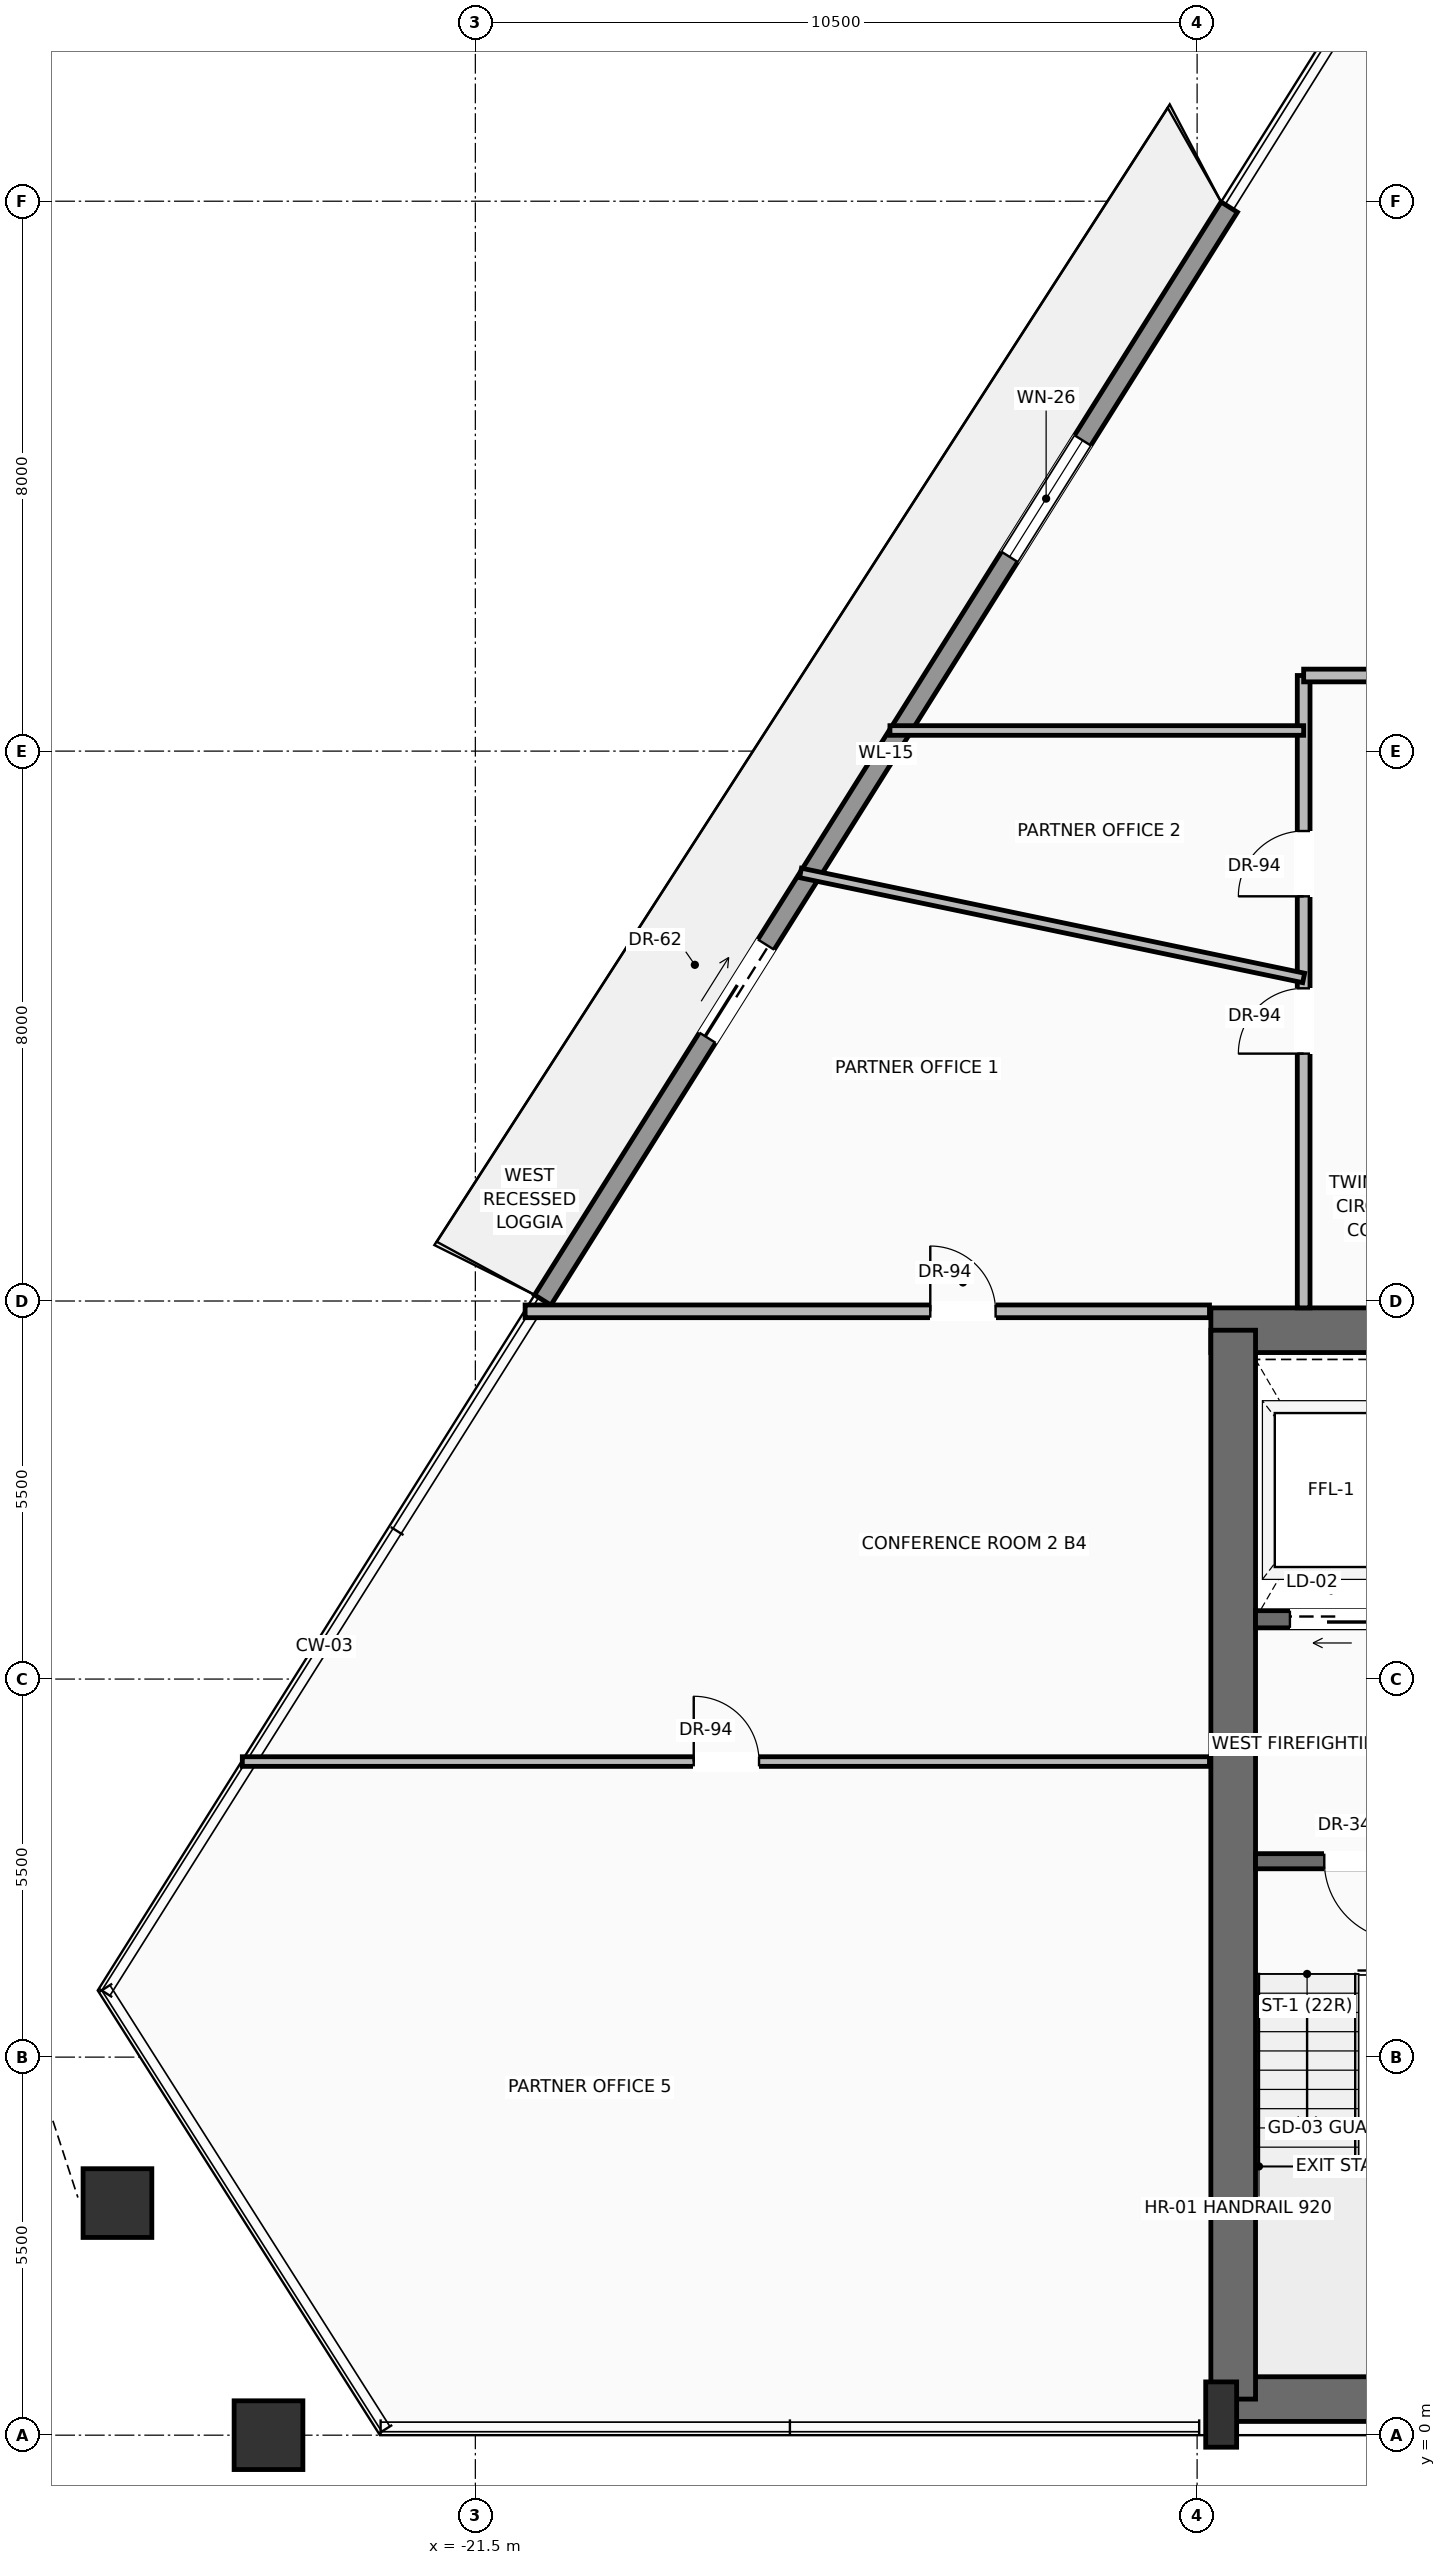
"""IFC4 building model, lengths in metres.
Left out: names, types, materials, properties, quantities, classifications, styles, units other than length and angle.
Written with IfcOpenShell. Run it as: python <this file> out.ifc"""

import sys

from ifc_helpers import new_model, si_unit, direction, frame, frame_2d, origin, origin_2d, place, context, subcontext, project, spatial, rectangle, hollow_rectangle, extrude, source, transform, mapped, element, fill, save


model = new_model("IFC4")
c1 = context("Model", 3, precision=1e-05, world=origin(), true_north=direction((0.0, 1.0)))
c2 = subcontext(c1, "Body", "Model", "MODEL_VIEW")
j1 = project(units=[si_unit("LENGTHUNIT", "METRE"), si_unit("PLANEANGLEUNIT", "RADIAN")], contexts=[c1])
p1 = place(None, origin())
s1 = spatial("IfcSite", under=j1, at=p1, CompositionType="ELEMENT")
p2 = place(p1, origin())
s2 = spatial("IfcBuilding", under=s1, at=p2, CompositionType="ELEMENT")
p3 = place(p2, frame((0.0, 0.0, 174.7)))
s3 = spatial("IfcBuildingStorey", under=s2, at=p3, CompositionType="ELEMENT", Elevation=174.7)
p4 = place(p3, frame((-10.65, 0.525, 0.0), z_axis=(0.0, 0.0, 1.0), x_axis=(1.0, 0.0, 0.0)))
e1 = element("IfcWall", 1, at=p4, inside=s3, PredefinedType="SHEAR", context=c2, shape_type="SweptSolid", body=[
    extrude(rectangle(XDim=21.3, YDim=0.65, at=frame_2d((10.65, 0.0))), origin(), (0.0, 0.0, 1.0), 3.47),
])
p5 = place(p3, frame((-10.8, 16.075, 0.0), z_axis=(0.0, 0.0, 1.0), x_axis=(1.0, 0.0, 0.0)))
e2 = element("IfcWall", 2, at=p5, inside=s3, PredefinedType="SHEAR", context=c2, shape_type="SweptSolid", body=[
    extrude(rectangle(XDim=21.6, YDim=0.65, at=frame_2d((10.8, 0.0))), origin(), (0.0, 0.0, 1.0), 3.47),
])
p6 = place(p5, frame((3.37, 0.0, 0.0)))
e3 = element("IfcOpeningElement", 3, at=p6, cuts=e2, PredefinedType="OPENING", context=c2, shape_type="SweptSolid", body=[
    extrude(rectangle(XDim=1.3, YDim=2.3, at=frame_2d((0.65, 1.15))), frame((0.0, 0.335, 0.0), z_axis=(0.0, -1.0, 0.0), x_axis=(1.0, 0.0, 0.0)), (0.0, 0.0, 1.0), 0.67),
])
p7 = place(p5, frame((9.8, 0.0, 0.0)))
e4 = element("IfcOpeningElement", 4, at=p7, cuts=e2, PredefinedType="OPENING", context=c2, shape_type="SweptSolid", body=[
    extrude(rectangle(XDim=2.0, YDim=2.4, at=frame_2d((1.0, 1.2))), frame((0.0, 0.335, 0.0), z_axis=(0.0, -1.0, 0.0), x_axis=(1.0, 0.0, 0.0)), (0.0, 0.0, 1.0), 0.67),
])
p8 = place(p3, frame((-10.475, 0.525, 0.0), z_axis=(0.0, 0.0, 1.0), x_axis=(0.0, 1.0, 0.0)))
e5 = element("IfcWall", 5, at=p8, inside=s3, PredefinedType="SHEAR", context=c2, shape_type="SweptSolid", body=[
    extrude(rectangle(XDim=15.55, YDim=0.65, at=frame_2d((7.775, 0.0))), origin(), (0.0, 0.0, 1.0), 3.47),
])
m1 = source(origin(), c2, "Body", "SweptSolid", [
    extrude(rectangle(XDim=0.45, YDim=0.95, at=origin_2d()), origin(), (0.0, 0.0, 1.0), 3.7),
])
p9 = place(p3, frame((-10.65, 0.3, 0.0), z_axis=(0.0, 0.0, 1.0), x_axis=(1.0, 0.0, 0.0)))
e6 = element("IfcColumn", 6, at=p9, inside=s3, PredefinedType="PILASTER", context=c2, shape_type="MappedRepresentation", body=[
    mapped(m1, transform((0.0, 0.0, 0.0), scale=1.0)),
])
m2 = source(origin(), c2, "Body", "SweptSolid", [
    extrude(hollow_rectangle(XDim=1.0, YDim=1.0, WallThickness=0.05, at=origin_2d()), origin(), (0.0, 0.0, 1.0), 3.691),
])
p10 = place(p3, frame((-24.509, 0.0, 0.004), z_axis=(-0.008135189482, 0.0, 0.999966908799), x_axis=(0.0, -1.0, 0.0)))
e7 = element("IfcColumn", 7, at=p10, inside=s3, PredefinedType="COLUMN", context=c2, shape_type="MappedRepresentation", body=[
    mapped(m2, transform((0.0, 0.0, 0.0), scale=1.0)),
])
m3 = source(origin(), c2, "Body", "SweptSolid", [
    extrude(hollow_rectangle(XDim=1.0, YDim=1.0, WallThickness=0.05, at=origin_2d()), origin(), (0.0, 0.0, 1.0), 3.692),
])
p11 = place(p3, frame((-26.707, 3.376, 0.004), z_axis=(0.002314679744, -0.015607554842, 0.999875515497), x_axis=(0.989180946289, 0.146700564068, 0.0)))
e8 = element("IfcColumn", 8, at=p11, inside=s3, PredefinedType="COLUMN", context=c2, shape_type="MappedRepresentation", body=[
    mapped(m3, transform((0.0, 0.0, 0.0), scale=1.0)),
])
p12 = place(p3, frame((-20.519, 16.514, 0.0), z_axis=(0.0, 0.0, 1.0), x_axis=(0.531871143151, 0.846825299034, 0.0)))
e9 = element("IfcWall", 9, at=p12, inside=s3, PredefinedType="SOLIDWALL", context=c2, shape_type="SweptSolid", body=[
    extrude(rectangle(XDim=18.777, YDim=0.28, at=frame_2d((9.388, 0.0))), origin(), (0.0, 0.0, 1.0), 3.05),
])
p13 = place(p12, frame((4.506, 0.0, 0.0)))
e10 = element("IfcOpeningElement", 10, at=p13, cuts=e9, PredefinedType="OPENING", context=c2, shape_type="SweptSolid", body=[
    extrude(rectangle(XDim=1.6, YDim=2.35, at=frame_2d((0.8, 1.175))), frame((0.0, 0.15, 0.0), z_axis=(0.0, -1.0, 0.0), x_axis=(1.0, 0.0, 0.0)), (0.0, 0.0, 1.0), 0.3),
])
p14 = place(p12, frame((12.768, 0.0, 0.9)))
e11 = element("IfcOpeningElement", 11, at=p14, cuts=e9, PredefinedType="OPENING", context=c2, shape_type="SweptSolid", body=[
    extrude(rectangle(XDim=2.0, YDim=1.85, at=frame_2d((1.0, 0.925))), frame((0.0, 0.15, 0.0), z_axis=(0.0, -1.0, 0.0), x_axis=(1.0, 0.0, 0.0)), (0.0, 0.0, 1.0), 0.3),
])
p15 = place(p3, frame((-5.5, 8.35, 0.0), z_axis=(0.0, 0.0, 1.0), x_axis=(-1.0, 0.0, 0.0)))
e12 = element("IfcWall", 12, at=p15, inside=s3, PredefinedType="SOLIDWALL", context=c2, shape_type="SweptSolid", body=[
    extrude(rectangle(XDim=4.65, YDim=0.22, at=frame_2d((2.325, 0.0))), origin(), (0.0, 0.0, 1.0), 3.47),
])
p16 = place(p15, frame((2.5, 0.0, 0.0)))
e13 = element("IfcOpeningElement", 13, at=p16, cuts=e12, PredefinedType="OPENING", context=c2, shape_type="SweptSolid", body=[
    extrude(rectangle(XDim=1.15, YDim=2.2, at=frame_2d((0.575, 1.1))), frame((0.0, 0.12, 0.0), z_axis=(0.0, -1.0, 0.0), x_axis=(1.0, 0.0, 0.0)), (0.0, 0.0, 1.0), 0.24),
])
p17 = place(p3, frame((-5.5, 11.87, 0.0), z_axis=(0.0, 0.0, 1.0), x_axis=(-1.0, 0.0, 0.0)))
e14 = element("IfcWall", 14, at=p17, inside=s3, PredefinedType="SOLIDWALL", context=c2, shape_type="SweptSolid", body=[
    extrude(rectangle(XDim=4.65, YDim=0.25, at=frame_2d((2.325, 0.0))), origin(), (0.0, 0.0, 1.0), 3.47),
])
p18 = place(p17, frame((2.95, 0.0, 0.0)))
e15 = element("IfcOpeningElement", 15, at=p18, cuts=e14, PredefinedType="OPENING", context=c2, shape_type="SweptSolid", body=[
    extrude(rectangle(XDim=1.2, YDim=2.25, at=frame_2d((0.6, 1.125))), frame((0.0, 0.135, 0.0), z_axis=(0.0, -1.0, 0.0), x_axis=(1.0, 0.0, 0.0)), (0.0, 0.0, 1.0), 0.27),
])
p19 = place(p3, frame((-9.45, 16.4, 0.0), z_axis=(0.0, 0.0, 1.0), x_axis=(0.0, 1.0, 0.0)))
e16 = element("IfcWall", 16, at=p19, inside=s3, PredefinedType="PARTITIONING", context=c2, shape_type="SweptSolid", body=[
    extrude(rectangle(XDim=9.2, YDim=0.185, at=frame_2d((4.6, 0.0))), origin(), (0.0, 0.0, 1.0), 2.846),
])
p20 = place(p19, frame((3.699, 0.0, 0.0)))
e17 = element("IfcOpeningElement", 17, at=p20, cuts=e16, PredefinedType="OPENING", context=c2, shape_type="SweptSolid", body=[
    extrude(rectangle(XDim=0.95, YDim=2.2, at=frame_2d((0.475, 1.1))), frame((0.0, 0.103, 0.0), z_axis=(0.0, -1.0, 0.0), x_axis=(1.0, 0.0, 0.0)), (0.0, 0.0, 1.0), 0.205),
])
p21 = place(p19, frame((5.988, 0.0, 0.0)))
e18 = element("IfcOpeningElement", 18, at=p21, cuts=e16, PredefinedType="OPENING", context=c2, shape_type="SweptSolid", body=[
    extrude(rectangle(XDim=0.95, YDim=2.2, at=frame_2d((0.475, 1.1))), frame((0.0, 0.103, 0.0), z_axis=(0.0, -1.0, 0.0), x_axis=(1.0, 0.0, 0.0)), (0.0, 0.0, 1.0), 0.205),
])
p22 = place(p3, frame((-9.45, 25.6, 0.0), z_axis=(0.0, 0.0, 1.0), x_axis=(1.0, 0.0, 0.0)))
e19 = element("IfcWall", 19, at=p22, inside=s3, PredefinedType="PARTITIONING", context=c2, shape_type="SweptSolid", body=[
    extrude(rectangle(XDim=2.2, YDim=0.185, at=frame_2d((1.1, 0.0))), origin(), (0.0, 0.0, 1.0), 3.462),
])
p23 = place(p3, frame((-20.776, 16.35, 0.0), z_axis=(0.0, 0.0, 1.0), x_axis=(1.0, 0.0, 0.0)))
e20 = element("IfcWall", 20, at=p23, inside=s3, PredefinedType="PARTITIONING", context=c2, shape_type="SweptSolid", body=[
    extrude(rectangle(XDim=9.956, YDim=0.185, at=frame_2d((4.978, 0.0))), origin(), (0.0, 0.0, 1.0), 3.462),
])
p24 = place(p23, frame((5.894, 0.0, 0.0)))
e21 = element("IfcOpeningElement", 21, at=p24, cuts=e20, PredefinedType="OPENING", context=c2, shape_type="SweptSolid", body=[
    extrude(rectangle(XDim=0.95, YDim=2.2, at=frame_2d((0.475, 1.1))), frame((0.0, 0.103, 0.0), z_axis=(0.0, -1.0, 0.0), x_axis=(1.0, 0.0, 0.0)), (0.0, 0.0, 1.0), 0.205),
])
p25 = place(p3, frame((-24.89, 9.8, 0.0), z_axis=(0.0, 0.0, 1.0), x_axis=(1.0, 0.0, 0.0)))
e22 = element("IfcWall", 22, at=p25, inside=s3, PredefinedType="PARTITIONING", context=c2, shape_type="SweptSolid", body=[
    extrude(rectangle(XDim=14.07, YDim=0.14, at=frame_2d((7.035, 0.0))), origin(), (0.0, 0.0, 1.0), 3.049),
])
p26 = place(p25, frame((6.567, 0.0, 0.0)))
e23 = element("IfcOpeningElement", 23, at=p26, cuts=e22, PredefinedType="OPENING", context=c2, shape_type="SweptSolid", body=[
    extrude(rectangle(XDim=0.95, YDim=2.2, at=frame_2d((0.475, 1.1))), frame((0.0, 0.08, 0.0), z_axis=(0.0, -1.0, 0.0), x_axis=(1.0, 0.0, 0.0)), (0.0, 0.0, 1.0), 0.16),
])
p27 = place(p3, frame((-16.77, 22.728, 0.0), z_axis=(0.0, 0.0, 1.0), x_axis=(0.978892052861, -0.204377955872, 0.0)))
e24 = element("IfcWall", 24, at=p27, inside=s3, PredefinedType="PARTITIONING", context=c2, shape_type="SweptSolid", body=[
    extrude(rectangle(XDim=7.478, YDim=0.14, at=frame_2d((3.739, 0.0))), origin(), (0.0, 0.0, 1.0), 3.049),
])
p28 = place(p3, frame((-15.469, 24.8, 0.0), z_axis=(0.0, 0.0, 1.0), x_axis=(1.0, 0.0, 0.0)))
e25 = element("IfcWall", 25, at=p28, inside=s3, PredefinedType="PARTITIONING", context=c2, shape_type="SweptSolid", body=[
    extrude(rectangle(XDim=6.019, YDim=0.14, at=frame_2d((3.009, 0.0))), origin(), (0.0, 0.0, 1.0), 3.462),
])
m4 = source(origin(), c2, "Body", "SweptSolid", [
    extrude(rectangle(XDim=1.6, YDim=2.35, at=frame_2d((0.8, 1.175))), frame((0.0, 0.025, 0.0), z_axis=(0.0, -1.0, 0.0), x_axis=(1.0, 0.0, 0.0)), (0.0, 0.0, 1.0), 0.05),
])
p29 = place(p13, origin())
e26 = element("IfcDoor", 26, at=p29, inside=s3, OperationType="SLIDING_TO_LEFT", PredefinedType="DOOR", context=c2, shape_type="MappedRepresentation", body=[
    mapped(m4, transform((0.0, 0.0, 0.0), scale=1.0)),
])
fill(e10, e26)
m5 = source(origin(), c2, "Body", "SweptSolid", [
    extrude(rectangle(XDim=2.0, YDim=1.85, at=frame_2d((1.0, 0.925))), frame((0.0, 0.03, 0.0), z_axis=(0.0, -1.0, 0.0), x_axis=(1.0, 0.0, 0.0)), (0.0, 0.0, 1.0), 0.06),
])
p30 = place(p14, origin())
e27 = element("IfcWindow", 27, at=p30, inside=s3, PartitioningType="SINGLE_PANEL", PredefinedType="WINDOW", context=c2, shape_type="MappedRepresentation", body=[
    mapped(m5, transform((0.0, 0.0, 0.0), scale=1.0)),
])
fill(e11, e27)
m6 = source(origin(), c2, "Body", "SweptSolid", [
    extrude(rectangle(XDim=1.15, YDim=2.2, at=frame_2d((0.575, 1.1))), frame((0.0, 0.025, 0.0), z_axis=(0.0, -1.0, 0.0), x_axis=(1.0, 0.0, 0.0)), (0.0, 0.0, 1.0), 0.05),
])
p31 = place(p16, origin())
e28 = element("IfcDoor", 28, at=p31, inside=s3, OperationType="SINGLE_SWING_LEFT", PredefinedType="DOOR", context=c2, shape_type="MappedRepresentation", body=[
    mapped(m6, transform((0.0, 0.0, 0.0), scale=1.0)),
])
fill(e13, e28)
m7 = source(origin(), c2, "Body", "SweptSolid", [
    extrude(rectangle(XDim=1.2, YDim=2.25, at=frame_2d((0.6, 1.125))), frame((0.0, 0.025, 0.0), z_axis=(0.0, -1.0, 0.0), x_axis=(1.0, 0.0, 0.0)), (0.0, 0.0, 1.0), 0.05),
])
p32 = place(p18, origin())
e29 = element("IfcDoor", 29, at=p32, inside=s3, OperationType="SLIDING_TO_LEFT", PredefinedType="DOOR", context=c2, shape_type="MappedRepresentation", body=[
    mapped(m7, transform((0.0, 0.0, 0.0), scale=1.0)),
])
fill(e15, e29)
m8 = source(origin(), c2, "Body", "SweptSolid", [
    extrude(rectangle(XDim=0.95, YDim=2.2, at=frame_2d((0.475, 1.1))), frame((0.0, 0.025, 0.0), z_axis=(0.0, -1.0, 0.0), x_axis=(1.0, 0.0, 0.0)), (0.0, 0.0, 1.0), 0.05),
])
p33 = place(p20, origin())
e30 = element("IfcDoor", 30, at=p33, inside=s3, OperationType="SINGLE_SWING_LEFT", PredefinedType="DOOR", context=c2, shape_type="MappedRepresentation", body=[
    mapped(m8, transform((0.0, 0.0, 0.0), scale=1.0)),
])
fill(e17, e30)
p34 = place(p24, origin())
e31 = element("IfcDoor", 31, at=p34, inside=s3, OperationType="SINGLE_SWING_LEFT", PredefinedType="DOOR", context=c2, shape_type="MappedRepresentation", body=[
    mapped(m8, transform((0.0, 0.0, 0.0), scale=1.0)),
])
fill(e21, e31)
p35 = place(p26, origin())
e32 = element("IfcDoor", 32, at=p35, inside=s3, OperationType="SINGLE_SWING_LEFT", PredefinedType="DOOR", context=c2, shape_type="MappedRepresentation", body=[
    mapped(m8, transform((0.0, 0.0, 0.0), scale=1.0)),
])
fill(e23, e32)
p36 = place(p21, origin())
e33 = element("IfcDoor", 33, at=p36, inside=s3, OperationType="SINGLE_SWING_LEFT", PredefinedType="DOOR", context=c2, shape_type="MappedRepresentation", body=[
    mapped(m8, transform((0.0, 0.0, 0.0), scale=1.0)),
])
fill(e18, e33)
save(model, sys.argv[1])
